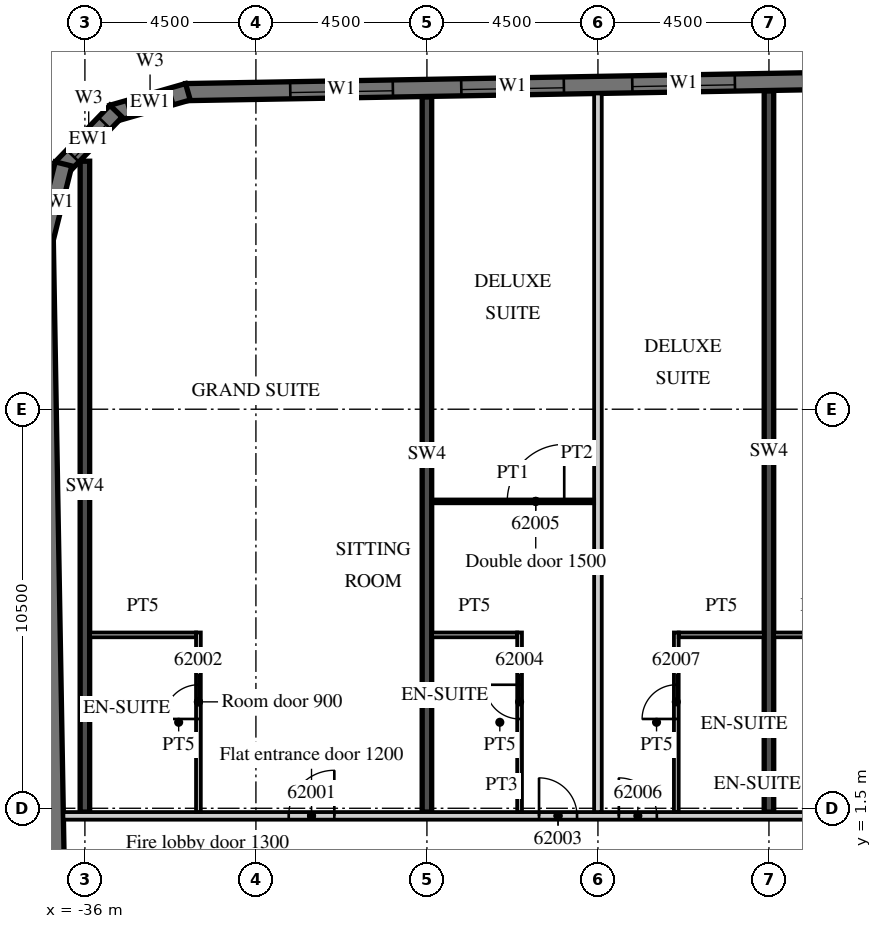
"""IFC4 building model, lengths in metres.
Left out: names, types, materials, properties, quantities, classifications, styles, units other than length and angle.
Written with IfcOpenShell. Run it as: python <this file> out.ifc"""

import sys

from ifc_helpers import new_model, si_unit, direction, frame, frame_2d, origin, place, context, subcontext, project, spatial, polyline, rectangle, outline, extrude, element, fill, save


model = new_model("IFC4")
c1 = context("Model", 3, precision=1e-05, world=origin(), true_north=direction((0.0, 1.0)))
c2 = subcontext(c1, "Body", "Model", "MODEL_VIEW")
j1 = project(units=[si_unit("LENGTHUNIT", "METRE"), si_unit("PLANEANGLEUNIT", "RADIAN")], contexts=[c1])
p1 = place(None, origin())
s1 = spatial("IfcSite", under=j1, at=p1, CompositionType="ELEMENT")
p2 = place(p1, origin())
s2 = spatial("IfcBuilding", under=s1, at=p2, CompositionType="ELEMENT")
p3 = place(p2, frame((0.0, 0.0, 250.7)))
s3 = spatial("IfcBuildingStorey", under=s2, at=p3, CompositionType="ELEMENT", Elevation=250.7)
p4 = place(p3, frame((-36.0, 1.4, 0.0), z_axis=(0.0, 0.0, 1.0), x_axis=(0.0, 1.0, 0.0)))
e1 = element("IfcWall", 1, at=p4, inside=s3, PredefinedType="SHEAR", context=c2, shape_type="SweptSolid", body=[
    extrude(rectangle(XDim=17.125, YDim=0.25, at=frame_2d((8.563, 0.0))), origin(), (0.0, 0.0, 1.0), 3.3),
])
p5 = place(p3, frame((-27.0, 1.4, 0.0), z_axis=(0.0, 0.0, 1.0), x_axis=(0.0, 1.0, 0.0)))
e2 = element("IfcWall", 2, at=p5, inside=s3, PredefinedType="SHEAR", context=c2, shape_type="SweptSolid", body=[
    extrude(rectangle(XDim=18.817, YDim=0.25, at=frame_2d((9.409, 0.0))), origin(), (0.0, 0.0, 1.0), 3.3),
])
p6 = place(p3, frame((-18.0, 1.4, 0.0), z_axis=(0.0, 0.0, 1.0), x_axis=(0.0, 1.0, 0.0)))
e3 = element("IfcWall", 3, at=p6, inside=s3, PredefinedType="SHEAR", context=c2, shape_type="SweptSolid", body=[
    extrude(rectangle(XDim=18.974, YDim=0.25, at=frame_2d((9.487, 0.0))), origin(), (0.0, 0.0, 1.0), 3.3),
])
p7 = place(p3, frame((-37.057, 16.503, 0.0), z_axis=(0.0, 0.0, 1.0), x_axis=(0.017452279857, -0.999847697366, 0.0)))
e4 = element("IfcWall", 4, at=p7, inside=s3, PredefinedType="SOLIDWALL", context=c2, shape_type="SweptSolid", body=[
    extrude(rectangle(XDim=33.0, YDim=0.45, at=frame_2d((16.5, 0.0))), origin(), (0.0, 0.0, 1.0), 3.02),
])
p8 = place(p3, frame((13.504, 21.161, 0.0), z_axis=(0.0, 0.0, 1.0), x_axis=(-0.999847763257, -0.017448504532, 0.0)))
e5 = element("IfcWall", 5, at=p8, inside=s3, PredefinedType="SOLIDWALL", context=c2, shape_type="SweptSolid", body=[
    extrude(rectangle(XDim=46.859, YDim=0.45, at=frame_2d((23.43, 0.0))), origin(), (0.0, 0.0, 1.0), 3.02),
])
p9 = place(p8, frame((0.9, 0.0, 0.45)))
e6 = element("IfcOpeningElement", 6, at=p9, cuts=e5, PredefinedType="OPENING", context=c2, shape_type="SweptSolid", body=[
    extrude(rectangle(XDim=2.7, YDim=2.25, at=frame_2d((1.35, 1.125))), frame((0.0, 0.235, 0.0), z_axis=(0.0, -1.0, 0.0), x_axis=(1.0, 0.0, 0.0)), (0.0, 0.0, 1.0), 0.47),
])
p10 = place(p8, frame((5.401, 0.0, 0.45)))
e7 = element("IfcOpeningElement", 7, at=p10, cuts=e5, PredefinedType="OPENING", context=c2, shape_type="SweptSolid", body=[
    extrude(rectangle(XDim=2.7, YDim=2.25, at=frame_2d((1.35, 1.125))), frame((0.0, 0.235, 0.0), z_axis=(0.0, -1.0, 0.0), x_axis=(1.0, 0.0, 0.0)), (0.0, 0.0, 1.0), 0.47),
])
p11 = place(p8, frame((9.902, 0.0, 0.45)))
e8 = element("IfcOpeningElement", 8, at=p11, cuts=e5, PredefinedType="OPENING", context=c2, shape_type="SweptSolid", body=[
    extrude(rectangle(XDim=2.7, YDim=2.25, at=frame_2d((1.35, 1.125))), frame((0.0, 0.235, 0.0), z_axis=(0.0, -1.0, 0.0), x_axis=(1.0, 0.0, 0.0)), (0.0, 0.0, 1.0), 0.47),
])
p12 = place(p8, frame((14.402, 0.0, 0.45)))
e9 = element("IfcOpeningElement", 9, at=p12, cuts=e5, PredefinedType="OPENING", context=c2, shape_type="SweptSolid", body=[
    extrude(rectangle(XDim=2.7, YDim=2.25, at=frame_2d((1.35, 1.125))), frame((0.0, 0.235, 0.0), z_axis=(0.0, -1.0, 0.0), x_axis=(1.0, 0.0, 0.0)), (0.0, 0.0, 1.0), 0.47),
])
p13 = place(p8, frame((18.903, 0.0, 0.45)))
e10 = element("IfcOpeningElement", 10, at=p13, cuts=e5, PredefinedType="OPENING", context=c2, shape_type="SweptSolid", body=[
    extrude(rectangle(XDim=2.7, YDim=2.25, at=frame_2d((1.35, 1.125))), frame((0.0, 0.235, 0.0), z_axis=(0.0, -1.0, 0.0), x_axis=(1.0, 0.0, 0.0)), (0.0, 0.0, 1.0), 0.47),
])
p14 = place(p8, frame((23.404, 0.0, 0.45)))
e11 = element("IfcOpeningElement", 11, at=p14, cuts=e5, PredefinedType="OPENING", context=c2, shape_type="SweptSolid", body=[
    extrude(rectangle(XDim=2.7, YDim=2.25, at=frame_2d((1.35, 1.125))), frame((0.0, 0.235, 0.0), z_axis=(0.0, -1.0, 0.0), x_axis=(1.0, 0.0, 0.0)), (0.0, 0.0, 1.0), 0.47),
])
p15 = place(p8, frame((27.904, 0.0, 0.45)))
e12 = element("IfcOpeningElement", 12, at=p15, cuts=e5, PredefinedType="OPENING", context=c2, shape_type="SweptSolid", body=[
    extrude(rectangle(XDim=2.7, YDim=2.25, at=frame_2d((1.35, 1.125))), frame((0.0, 0.235, 0.0), z_axis=(0.0, -1.0, 0.0), x_axis=(1.0, 0.0, 0.0)), (0.0, 0.0, 1.0), 0.47),
])
p16 = place(p8, frame((32.405, 0.0, 0.45)))
e13 = element("IfcOpeningElement", 13, at=p16, cuts=e5, PredefinedType="OPENING", context=c2, shape_type="SweptSolid", body=[
    extrude(rectangle(XDim=2.7, YDim=2.25, at=frame_2d((1.35, 1.125))), frame((0.0, 0.235, 0.0), z_axis=(0.0, -1.0, 0.0), x_axis=(1.0, 0.0, 0.0)), (0.0, 0.0, 1.0), 0.47),
])
p17 = place(p8, frame((36.906, 0.0, 0.45)))
e14 = element("IfcOpeningElement", 14, at=p17, cuts=e5, PredefinedType="OPENING", context=c2, shape_type="SweptSolid", body=[
    extrude(rectangle(XDim=2.7, YDim=2.25, at=frame_2d((1.35, 1.125))), frame((0.0, 0.235, 0.0), z_axis=(0.0, -1.0, 0.0), x_axis=(1.0, 0.0, 0.0)), (0.0, 0.0, 1.0), 0.47),
])
p18 = place(p8, frame((41.406, 0.0, 0.45)))
e15 = element("IfcOpeningElement", 15, at=p18, cuts=e5, PredefinedType="OPENING", context=c2, shape_type="SweptSolid", body=[
    extrude(rectangle(XDim=2.7, YDim=2.25, at=frame_2d((1.35, 1.125))), frame((0.0, 0.235, 0.0), z_axis=(0.0, -1.0, 0.0), x_axis=(1.0, 0.0, 0.0)), (0.0, 0.0, 1.0), 0.47),
])
p19 = place(p3, frame((-33.29, 20.352, 0.0), z_axis=(0.0, 0.0, 1.0), x_axis=(-0.961247584925, -0.275686562016, 0.0)))
e16 = element("IfcWall", 16, at=p19, inside=s3, PredefinedType="SOLIDWALL", context=c2, shape_type="SweptSolid", body=[
    extrude(outline(polyline([(0.0, -0.225), (2.071, -0.225), (1.95, 0.225), (0.121, 0.225), (0.0, -0.225)])), origin(), (0.0, 0.0, 1.0), 3.02),
])
p20 = place(p19, frame((0.435, 0.0, 0.45)))
e17 = element("IfcOpeningElement", 17, at=p20, cuts=e16, PredefinedType="OPENING", context=c2, shape_type="SweptSolid", body=[
    extrude(rectangle(XDim=1.2, YDim=2.25, at=frame_2d((0.6, 1.125))), frame((0.0, 0.235, 0.0), z_axis=(0.0, -1.0, 0.0), x_axis=(1.0, 0.0, 0.0)), (0.0, 0.0, 1.0), 0.47),
])
p21 = place(p3, frame((-35.181, 19.842, 0.0), z_axis=(0.0, 0.0, 1.0), x_axis=(-0.694678672846, -0.719320193998, 0.0)))
e18 = element("IfcWall", 18, at=p21, inside=s3, PredefinedType="SOLIDWALL", context=c2, shape_type="SweptSolid", body=[
    extrude(outline(polyline([(0.0, -0.225), (2.071, -0.225), (1.95, 0.225), (0.121, 0.225), (0.0, -0.225)])), origin(), (0.0, 0.0, 1.0), 3.02),
])
p22 = place(p21, frame((0.435, 0.0, 0.45)))
e19 = element("IfcOpeningElement", 19, at=p22, cuts=e18, PredefinedType="OPENING", context=c2, shape_type="SweptSolid", body=[
    extrude(rectangle(XDim=1.2, YDim=2.25, at=frame_2d((0.6, 1.125))), frame((0.0, 0.235, 0.0), z_axis=(0.0, -1.0, 0.0), x_axis=(1.0, 0.0, 0.0)), (0.0, 0.0, 1.0), 0.47),
])
p23 = place(p3, frame((-36.563, 18.454, 0.0), z_axis=(0.0, 0.0, 1.0), x_axis=(-0.241869623482, -0.970308757683, 0.0)))
e20 = element("IfcWall", 20, at=p23, inside=s3, PredefinedType="SOLIDWALL", context=c2, shape_type="SweptSolid", body=[
    extrude(outline(polyline([(-0.0, -0.225), (2.07, -0.225), (1.95, 0.225), (0.12, 0.225), (-0.0, -0.225)])), origin(), (0.0, 0.0, 1.0), 3.02),
])
p24 = place(p3, frame((-36.566, 1.3, 0.0), z_axis=(0.0, 0.0, 1.0), x_axis=(1.0, 0.0, 0.0)))
e21 = element("IfcWall", 21, at=p24, inside=s3, PredefinedType="PARTITIONING", context=c2, shape_type="SweptSolid", body=[
    extrude(rectangle(XDim=23.066, YDim=0.2, at=frame_2d((11.533, 0.0))), origin(), (0.0, 0.0, 1.0), 3.02),
])
p25 = place(p24, frame((5.929, 0.0, 0.0)))
e22 = element("IfcOpeningElement", 22, at=p25, cuts=e21, PredefinedType="OPENING", context=c2, shape_type="SweptSolid", body=[
    extrude(rectangle(XDim=1.2, YDim=2.1, at=frame_2d((0.6, 1.05))), frame((0.0, 0.11, 0.0), z_axis=(0.0, -1.0, 0.0), x_axis=(1.0, 0.0, 0.0)), (0.0, 0.0, 1.0), 0.22),
])
p26 = place(p24, frame((12.516, 0.0, 0.0)))
e23 = element("IfcOpeningElement", 23, at=p26, cuts=e21, PredefinedType="OPENING", context=c2, shape_type="SweptSolid", body=[
    extrude(rectangle(XDim=1.0, YDim=2.1, at=frame_2d((0.5, 1.05))), frame((0.0, 0.11, 0.0), z_axis=(0.0, -1.0, 0.0), x_axis=(1.0, 0.0, 0.0)), (0.0, 0.0, 1.0), 0.22),
])
p27 = place(p24, frame((14.616, 0.0, 0.0)))
e24 = element("IfcOpeningElement", 24, at=p27, cuts=e21, PredefinedType="OPENING", context=c2, shape_type="SweptSolid", body=[
    extrude(rectangle(XDim=1.0, YDim=2.1, at=frame_2d((0.5, 1.05))), frame((0.0, 0.11, 0.0), z_axis=(0.0, -1.0, 0.0), x_axis=(1.0, 0.0, 0.0)), (0.0, 0.0, 1.0), 0.22),
])
p28 = place(p24, frame((21.491, 0.0, 0.0)))
e25 = element("IfcOpeningElement", 25, at=p28, cuts=e21, PredefinedType="OPENING", context=c2, shape_type="SweptSolid", body=[
    extrude(rectangle(XDim=1.0, YDim=2.1, at=frame_2d((0.5, 1.05))), frame((0.0, 0.11, 0.0), z_axis=(0.0, -1.0, 0.0), x_axis=(1.0, 0.0, 0.0)), (0.0, 0.0, 1.0), 0.22),
])
p29 = place(p3, frame((-33.013, 1.4, 0.0), z_axis=(0.0, 0.0, 1.0), x_axis=(0.0, 1.0, 0.0)))
e26 = element("IfcWall", 26, at=p29, inside=s3, PredefinedType="PARTITIONING", context=c2, shape_type="SweptSolid", body=[
    extrude(rectangle(XDim=4.725, YDim=0.125, at=frame_2d((2.363, 0.0))), origin(), (0.0, 0.0, 1.0), 3.02),
])
p30 = place(p29, frame((2.45, 0.0, 0.0)))
e27 = element("IfcOpeningElement", 27, at=p30, cuts=e26, PredefinedType="OPENING", context=c2, shape_type="SweptSolid", body=[
    extrude(rectangle(XDim=0.9, YDim=2.1, at=frame_2d((0.45, 1.05))), frame((0.0, 0.073, 0.0), z_axis=(0.0, -1.0, 0.0), x_axis=(1.0, 0.0, 0.0)), (0.0, 0.0, 1.0), 0.145),
])
p31 = place(p3, frame((-35.875, 6.062, 0.0), z_axis=(0.0, 0.0, 1.0), x_axis=(1.0, 0.0, 0.0)))
e28 = element("IfcWall", 28, at=p31, inside=s3, PredefinedType="PARTITIONING", context=c2, shape_type="SweptSolid", body=[
    extrude(rectangle(XDim=2.8, YDim=0.125, at=frame_2d((1.4, 0.0))), origin(), (0.0, 0.0, 1.0), 3.02),
])
p32 = place(p3, frame((-22.5, 1.4, 0.0), z_axis=(0.0, 0.0, 1.0), x_axis=(0.0, 1.0, 0.0)))
e29 = element("IfcWall", 29, at=p32, inside=s3, PredefinedType="PARTITIONING", context=c2, shape_type="SweptSolid", body=[
    extrude(rectangle(XDim=18.908, YDim=0.2, at=frame_2d((9.454, 0.0))), origin(), (0.0, 0.0, 1.0), 3.02),
])
p33 = place(p3, frame((-24.562, 1.4, 0.0), z_axis=(0.0, 0.0, 1.0), x_axis=(0.0, 1.0, 0.0)))
e30 = element("IfcWall", 30, at=p33, inside=s3, PredefinedType="PARTITIONING", context=c2, shape_type="SweptSolid", body=[
    extrude(rectangle(XDim=4.725, YDim=0.125, at=frame_2d((2.363, 0.0))), origin(), (0.0, 0.0, 1.0), 3.02),
])
p34 = place(p33, frame((2.45, 0.0, 0.0)))
e31 = element("IfcOpeningElement", 31, at=p34, cuts=e30, PredefinedType="OPENING", context=c2, shape_type="SweptSolid", body=[
    extrude(rectangle(XDim=0.9, YDim=2.1, at=frame_2d((0.45, 1.05))), frame((0.0, 0.073, 0.0), z_axis=(0.0, -1.0, 0.0), x_axis=(1.0, 0.0, 0.0)), (0.0, 0.0, 1.0), 0.145),
])
p35 = place(p3, frame((-26.875, 6.062, 0.0), z_axis=(0.0, 0.0, 1.0), x_axis=(1.0, 0.0, 0.0)))
e32 = element("IfcWall", 32, at=p35, inside=s3, PredefinedType="PARTITIONING", context=c2, shape_type="SweptSolid", body=[
    extrude(rectangle(XDim=2.25, YDim=0.125, at=frame_2d((1.125, 0.0))), origin(), (0.0, 0.0, 1.0), 3.02),
])
p36 = place(p3, frame((-26.875, 9.575, 0.0), z_axis=(0.0, 0.0, 1.0), x_axis=(1.0, 0.0, 0.0)))
e33 = element("IfcWall", 33, at=p36, inside=s3, PredefinedType="PARTITIONING", context=c2, shape_type="SweptSolid", body=[
    extrude(rectangle(XDim=4.275, YDim=0.1, at=frame_2d((2.137, 0.0))), origin(), (0.0, 0.0, 1.0), 3.02),
])
p37 = place(p36, frame((1.988, 0.0, 0.0)))
e34 = element("IfcOpeningElement", 34, at=p37, cuts=e33, PredefinedType="OPENING", context=c2, shape_type="SweptSolid", body=[
    extrude(rectangle(XDim=1.5, YDim=2.1, at=frame_2d((0.75, 1.05))), frame((0.0, 0.06, 0.0), z_axis=(0.0, -1.0, 0.0), x_axis=(1.0, 0.0, 0.0)), (0.0, 0.0, 1.0), 0.12),
])
p38 = place(p3, frame((-20.438, 1.4, 0.0), z_axis=(0.0, 0.0, 1.0), x_axis=(0.0, 1.0, 0.0)))
e35 = element("IfcWall", 35, at=p38, inside=s3, PredefinedType="PARTITIONING", context=c2, shape_type="SweptSolid", body=[
    extrude(rectangle(XDim=4.725, YDim=0.125, at=frame_2d((2.363, 0.0))), origin(), (0.0, 0.0, 1.0), 3.02),
])
p39 = place(p38, frame((2.45, 0.0, 0.0)))
e36 = element("IfcOpeningElement", 36, at=p39, cuts=e35, PredefinedType="OPENING", context=c2, shape_type="SweptSolid", body=[
    extrude(rectangle(XDim=0.9, YDim=2.1, at=frame_2d((0.45, 1.05))), frame((0.0, 0.073, 0.0), z_axis=(0.0, -1.0, 0.0), x_axis=(1.0, 0.0, 0.0)), (0.0, 0.0, 1.0), 0.145),
])
for number, where, z_axis, x_axis in (
    (37, (-20.375, 6.062, 0.0), (0.0, 0.0, 1.0), (1.0, 0.0, 0.0)),
    (38, (-17.875, 6.062, 0.0), (0.0, 0.0, 1.0), (1.0, 0.0, 0.0)),
):
    element("IfcWall", number, at=place(p3, frame(where, z_axis=z_axis, x_axis=x_axis)), inside=s3, PredefinedType="PARTITIONING", context=c2, shape_type="SweptSolid", body=[
        extrude(rectangle(XDim=2.25, YDim=0.125, at=frame_2d((1.125, 0.0))), origin(), (0.0, 0.0, 1.0), 3.02),
    ])
p40 = place(p16, origin())
e39 = element("IfcWindow", 39, at=p40, inside=s3, PartitioningType="SINGLE_PANEL", PredefinedType="WINDOW", context=c2, shape_type="SweptSolid", body=[
    extrude(rectangle(XDim=2.7, YDim=2.25, at=frame_2d((1.35, 1.125))), frame((0.0, 0.09, 0.0), z_axis=(0.0, -1.0, 0.0), x_axis=(1.0, 0.0, 0.0)), (0.0, 0.0, 1.0), 0.06),
])
fill(e13, e39)
p41 = place(p17, origin())
e40 = element("IfcWindow", 40, at=p41, inside=s3, PartitioningType="SINGLE_PANEL", PredefinedType="WINDOW", context=c2, shape_type="SweptSolid", body=[
    extrude(rectangle(XDim=2.7, YDim=2.25, at=frame_2d((1.35, 1.125))), frame((0.0, 0.09, 0.0), z_axis=(0.0, -1.0, 0.0), x_axis=(1.0, 0.0, 0.0)), (0.0, 0.0, 1.0), 0.06),
])
fill(e14, e40)
p42 = place(p18, origin())
e41 = element("IfcWindow", 41, at=p42, inside=s3, PartitioningType="SINGLE_PANEL", PredefinedType="WINDOW", context=c2, shape_type="SweptSolid", body=[
    extrude(rectangle(XDim=2.7, YDim=2.25, at=frame_2d((1.35, 1.125))), frame((0.0, 0.09, 0.0), z_axis=(0.0, -1.0, 0.0), x_axis=(1.0, 0.0, 0.0)), (0.0, 0.0, 1.0), 0.06),
])
fill(e15, e41)
p43 = place(p20, origin())
e42 = element("IfcWindow", 42, at=p43, inside=s3, PartitioningType="SINGLE_PANEL", PredefinedType="WINDOW", context=c2, shape_type="SweptSolid", body=[
    extrude(rectangle(XDim=1.2, YDim=2.25, at=frame_2d((0.6, 1.125))), frame((0.0, 0.09, 0.0), z_axis=(0.0, -1.0, 0.0), x_axis=(1.0, 0.0, 0.0)), (0.0, 0.0, 1.0), 0.06),
])
fill(e17, e42)
p44 = place(p22, origin())
e43 = element("IfcWindow", 43, at=p44, inside=s3, PartitioningType="SINGLE_PANEL", PredefinedType="WINDOW", context=c2, shape_type="SweptSolid", body=[
    extrude(rectangle(XDim=1.2, YDim=2.25, at=frame_2d((0.6, 1.125))), frame((0.0, 0.09, 0.0), z_axis=(0.0, -1.0, 0.0), x_axis=(1.0, 0.0, 0.0)), (0.0, 0.0, 1.0), 0.06),
])
fill(e19, e43)
p45 = place(p25, origin())
e44 = element("IfcDoor", 44, at=p45, inside=s3, OperationType="SINGLE_SWING_RIGHT", PredefinedType="DOOR", context=c2, shape_type="SweptSolid", body=[
    extrude(rectangle(XDim=1.2, YDim=2.1, at=frame_2d((0.6, 1.05))), frame((0.0, 0.025, 0.0), z_axis=(0.0, -1.0, 0.0), x_axis=(1.0, 0.0, 0.0)), (0.0, 0.0, 1.0), 0.05),
])
fill(e22, e44)
p46 = place(p30, origin())
e45 = element("IfcDoor", 45, at=p46, inside=s3, OperationType="SINGLE_SWING_LEFT", PredefinedType="DOOR", context=c2, shape_type="SweptSolid", body=[
    extrude(rectangle(XDim=0.9, YDim=2.1, at=frame_2d((0.45, 1.05))), frame((0.0, 0.025, 0.0), z_axis=(0.0, -1.0, 0.0), x_axis=(1.0, 0.0, 0.0)), (0.0, 0.0, 1.0), 0.05),
])
fill(e27, e45)
p47 = place(p26, origin())
e46 = element("IfcDoor", 46, at=p47, inside=s3, OperationType="SINGLE_SWING_LEFT", PredefinedType="DOOR", context=c2, shape_type="SweptSolid", body=[
    extrude(rectangle(XDim=1.0, YDim=2.1, at=frame_2d((0.5, 1.05))), frame((0.0, 0.025, 0.0), z_axis=(0.0, -1.0, 0.0), x_axis=(1.0, 0.0, 0.0)), (0.0, 0.0, 1.0), 0.05),
])
fill(e23, e46)
p48 = place(p34, origin())
e47 = element("IfcDoor", 47, at=p48, inside=s3, OperationType="SINGLE_SWING_RIGHT", PredefinedType="DOOR", context=c2, shape_type="SweptSolid", body=[
    extrude(rectangle(XDim=0.9, YDim=2.1, at=frame_2d((0.45, 1.05))), frame((0.0, 0.025, 0.0), z_axis=(0.0, -1.0, 0.0), x_axis=(1.0, 0.0, 0.0)), (0.0, 0.0, 1.0), 0.05),
])
fill(e31, e47)
p49 = place(p37, origin())
e48 = element("IfcDoor", 48, at=p49, inside=s3, OperationType="SINGLE_SWING_RIGHT", PredefinedType="DOOR", context=c2, shape_type="SweptSolid", body=[
    extrude(rectangle(XDim=1.5, YDim=2.1, at=frame_2d((0.75, 1.05))), frame((0.0, 0.025, 0.0), z_axis=(0.0, -1.0, 0.0), x_axis=(1.0, 0.0, 0.0)), (0.0, 0.0, 1.0), 0.05),
])
fill(e34, e48)
p50 = place(p27, origin())
e49 = element("IfcDoor", 49, at=p50, inside=s3, OperationType="SINGLE_SWING_LEFT", PredefinedType="DOOR", context=c2, shape_type="SweptSolid", body=[
    extrude(rectangle(XDim=1.0, YDim=2.1, at=frame_2d((0.5, 1.05))), frame((0.0, 0.025, 0.0), z_axis=(0.0, -1.0, 0.0), x_axis=(1.0, 0.0, 0.0)), (0.0, 0.0, 1.0), 0.05),
])
fill(e24, e49)
p51 = place(p39, origin())
e50 = element("IfcDoor", 50, at=p51, inside=s3, OperationType="SINGLE_SWING_LEFT", PredefinedType="DOOR", context=c2, shape_type="SweptSolid", body=[
    extrude(rectangle(XDim=0.9, YDim=2.1, at=frame_2d((0.45, 1.05))), frame((0.0, 0.025, 0.0), z_axis=(0.0, -1.0, 0.0), x_axis=(1.0, 0.0, 0.0)), (0.0, 0.0, 1.0), 0.05),
])
fill(e36, e50)
save(model, sys.argv[1])
